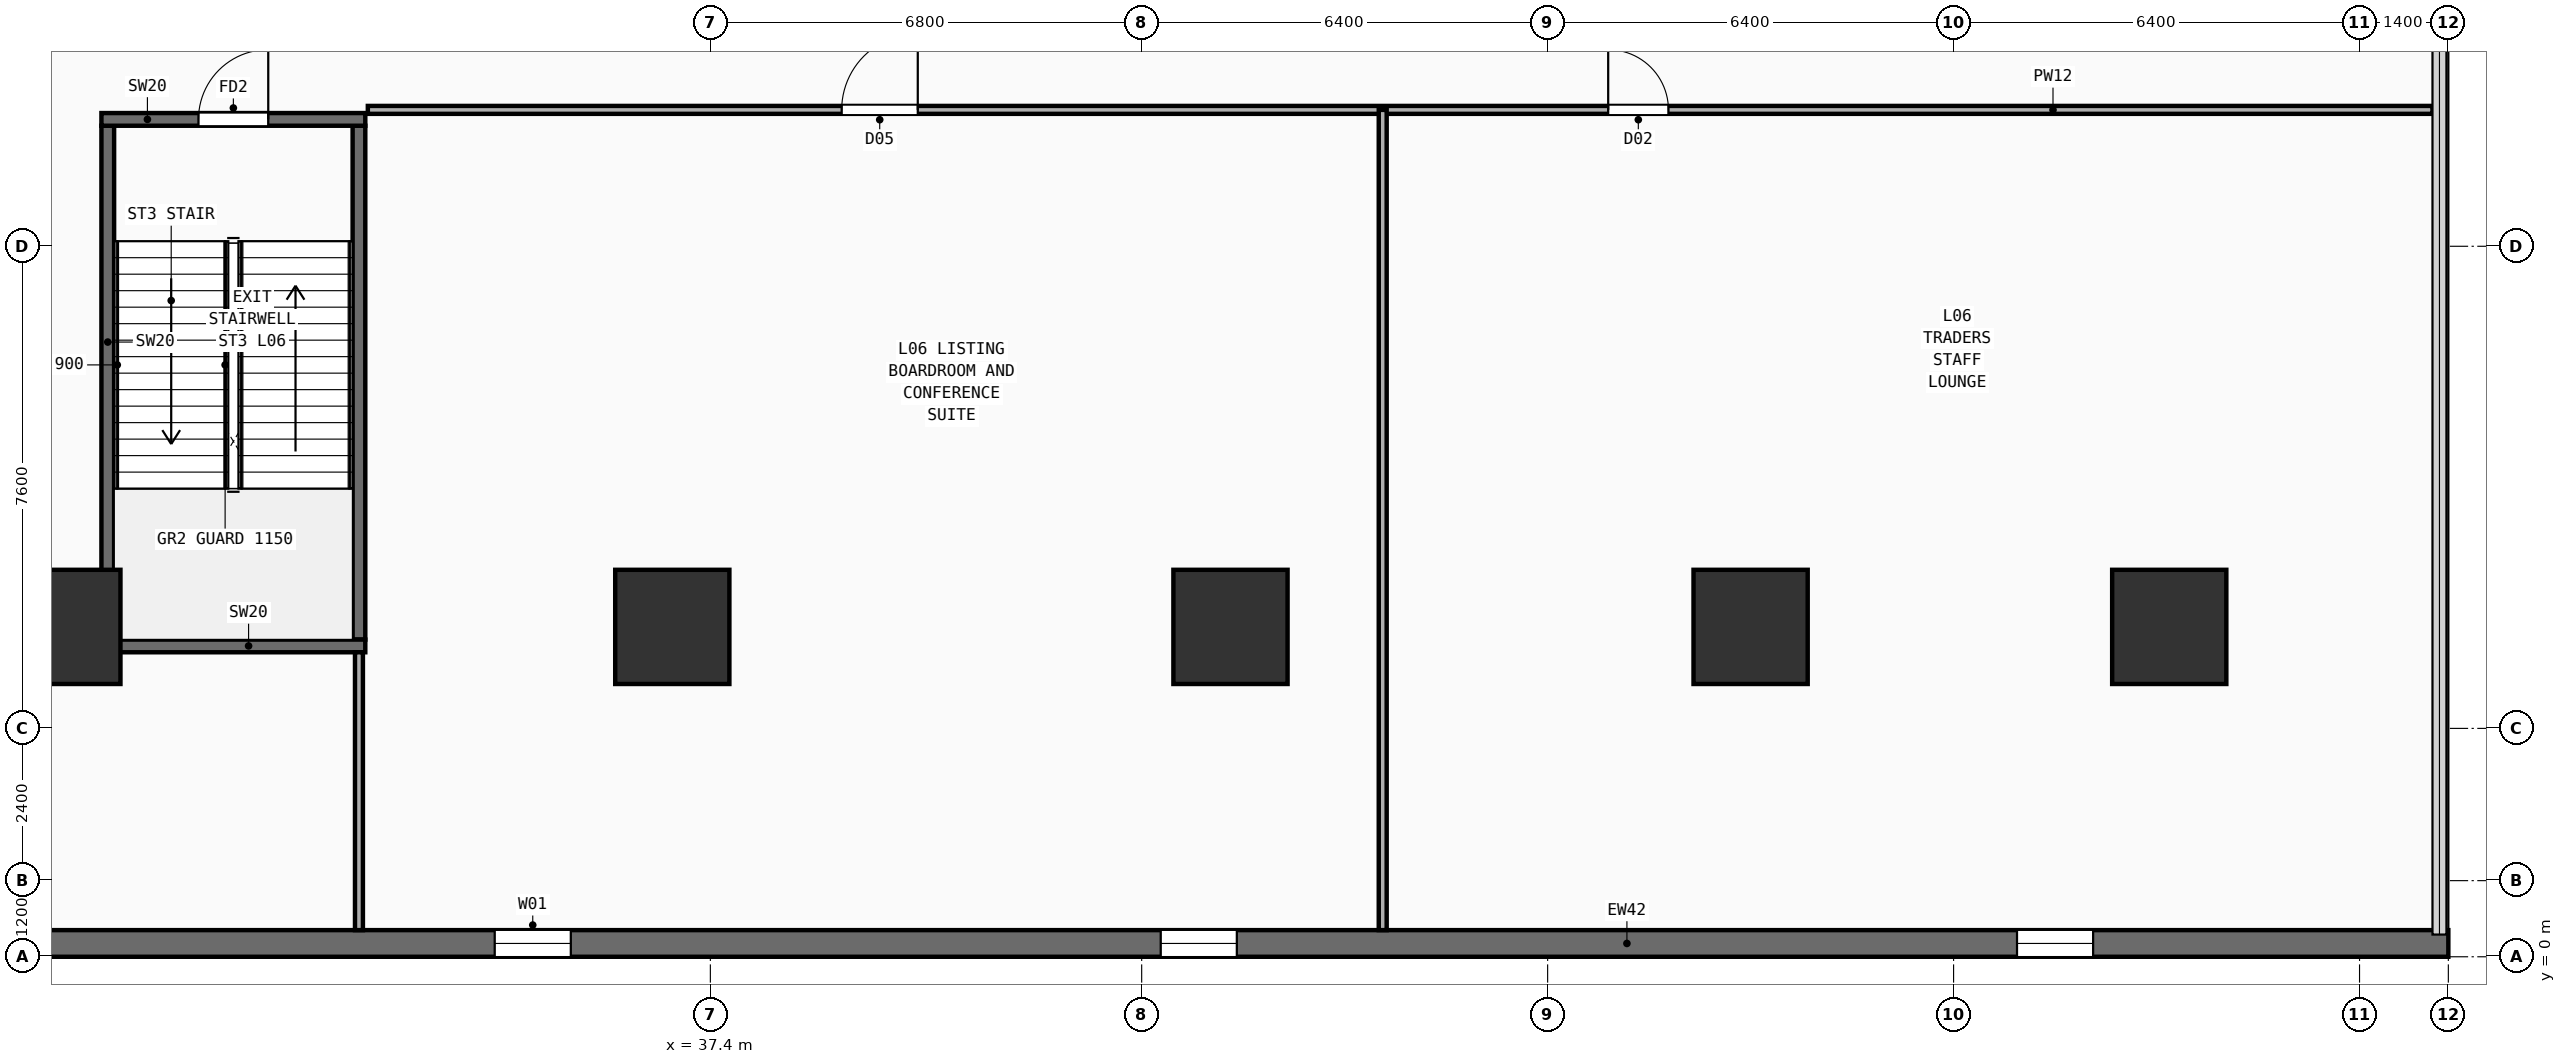
"""IFC4 building model, lengths in metres.
Left out: names, types, materials, properties, quantities, classifications, styles, units other than length and angle.
Written with IfcOpenShell. Run it as: python <this file> out.ifc"""

import sys

from ifc_helpers import new_model, si_unit, direction, frame, frame_2d, origin, origin_2d, place, context, subcontext, project, spatial, rectangle, extrude, element, fill, save


model = new_model("IFC4")
c1 = context("Model", 3, precision=1e-05, world=origin(), true_north=direction((0.0, 1.0)))
c2 = subcontext(c1, "Body", "Model", "MODEL_VIEW")
j1 = project(units=[si_unit("LENGTHUNIT", "METRE"), si_unit("PLANEANGLEUNIT", "RADIAN")], contexts=[c1])
p1 = place(None, origin())
s1 = spatial("IfcSite", under=j1, at=p1, CompositionType="ELEMENT")
p2 = place(p1, origin())
s2 = spatial("IfcBuilding", under=s1, at=p2, CompositionType="ELEMENT")
p3 = place(p2, frame((0.0, 0.0, 24.8)))
s3 = spatial("IfcBuildingStorey", under=s2, at=p3, CompositionType="ELEMENT", Elevation=24.8)
for number, where, z_axis, x_axis in (
    (1, (27.2, 5.2, 0.0), (0.0, 0.0, 1.0), (1.0, 0.0, 0.0)),
    (2, (36.8, 5.2, 0.0), (0.0, 0.0, 1.0), (1.0, 0.0, 0.0)),
    (3, (45.6, 5.2, 0.0), (0.0, 0.0, 1.0), (1.0, 0.0, 0.0)),
    (4, (53.8, 5.2, 0.0), (0.0, 0.0, 1.0), (1.0, 0.0, 0.0)),
    (5, (60.4, 5.2, 0.0), (0.0, 0.0, 1.0), (1.0, 0.0, 0.0)),
):
    element("IfcColumn", number, at=place(p3, frame(where, z_axis=z_axis, x_axis=x_axis)), inside=s3, PredefinedType="COLUMN", context=c2, shape_type="SweptSolid", body=[
        extrude(rectangle(XDim=1.8, YDim=1.8, at=origin_2d()), origin(), (0.0, 0.0, 1.0), 4.35),
    ])
p4 = place(p3, frame((0.0, 0.21, 0.0), z_axis=(0.0, 0.0, 1.0), x_axis=(1.0, 0.0, 0.0)))
e6 = element("IfcWall", 6, at=p4, inside=s3, PredefinedType="SOLIDWALL", context=c2, shape_type="SweptSolid", body=[
    extrude(rectangle(XDim=64.8, YDim=0.42, at=frame_2d((32.4, 0.0))), origin(), (0.0, 0.0, 1.0), 4.35),
])
p5 = place(p4, frame((8.0, 0.0, 0.95)))
e7 = element("IfcOpeningElement", 7, at=p5, cuts=e6, PredefinedType="OPENING", context=c2, shape_type="SweptSolid", body=[
    extrude(rectangle(XDim=1.2, YDim=1.6, at=frame_2d((0.6, 0.8))), frame((0.0, 0.22, 0.0), z_axis=(0.0, -1.0, 0.0), x_axis=(1.0, 0.0, 0.0)), (0.0, 0.0, 1.0), 0.44),
])
p6 = place(p4, frame((16.0, 0.0, 0.95)))
e8 = element("IfcOpeningElement", 8, at=p6, cuts=e6, PredefinedType="OPENING", context=c2, shape_type="SweptSolid", body=[
    extrude(rectangle(XDim=1.2, YDim=1.6, at=frame_2d((0.6, 0.8))), frame((0.0, 0.22, 0.0), z_axis=(0.0, -1.0, 0.0), x_axis=(1.0, 0.0, 0.0)), (0.0, 0.0, 1.0), 0.44),
])
p7 = place(p4, frame((24.0, 0.0, 0.95)))
e9 = element("IfcOpeningElement", 9, at=p7, cuts=e6, PredefinedType="OPENING", context=c2, shape_type="SweptSolid", body=[
    extrude(rectangle(XDim=1.2, YDim=1.6, at=frame_2d((0.6, 0.8))), frame((0.0, 0.22, 0.0), z_axis=(0.0, -1.0, 0.0), x_axis=(1.0, 0.0, 0.0)), (0.0, 0.0, 1.0), 0.44),
])
p8 = place(p4, frame((34.0, 0.0, 0.95)))
e10 = element("IfcOpeningElement", 10, at=p8, cuts=e6, PredefinedType="OPENING", context=c2, shape_type="SweptSolid", body=[
    extrude(rectangle(XDim=1.2, YDim=1.6, at=frame_2d((0.6, 0.8))), frame((0.0, 0.22, 0.0), z_axis=(0.0, -1.0, 0.0), x_axis=(1.0, 0.0, 0.0)), (0.0, 0.0, 1.0), 0.44),
])
p9 = place(p4, frame((44.5, 0.0, 0.95)))
e11 = element("IfcOpeningElement", 11, at=p9, cuts=e6, PredefinedType="OPENING", context=c2, shape_type="SweptSolid", body=[
    extrude(rectangle(XDim=1.2, YDim=1.6, at=frame_2d((0.6, 0.8))), frame((0.0, 0.22, 0.0), z_axis=(0.0, -1.0, 0.0), x_axis=(1.0, 0.0, 0.0)), (0.0, 0.0, 1.0), 0.44),
])
p10 = place(p4, frame((58.0, 0.0, 0.95)))
e12 = element("IfcOpeningElement", 12, at=p10, cuts=e6, PredefinedType="OPENING", context=c2, shape_type="SweptSolid", body=[
    extrude(rectangle(XDim=1.2, YDim=1.6, at=frame_2d((0.6, 0.8))), frame((0.0, 0.22, 0.0), z_axis=(0.0, -1.0, 0.0), x_axis=(1.0, 0.0, 0.0)), (0.0, 0.0, 1.0), 0.44),
])
for number, where, z_axis, x_axis in (
    (13, (27.9, 5.0, 0.0), (0.0, 0.0, 1.0), (0.0, 1.0, 0.0)),
    (14, (31.86, 5.0, 0.0), (0.0, 0.0, 1.0), (0.0, 1.0, 0.0)),
):
    element("IfcWall", number, at=place(p3, frame(where, z_axis=z_axis, x_axis=x_axis)), inside=s3, PredefinedType="SHEAR", context=c2, shape_type="SweptSolid", body=[
        extrude(rectangle(XDim=8.1, YDim=0.2, at=frame_2d((4.05, 0.0))), origin(), (0.0, 0.0, 1.0), 4.35),
    ])
p11 = place(p3, frame((27.8, 4.9, 0.0), z_axis=(0.0, 0.0, 1.0), x_axis=(1.0, 0.0, 0.0)))
e15 = element("IfcWall", 15, at=p11, inside=s3, PredefinedType="SHEAR", context=c2, shape_type="SweptSolid", body=[
    extrude(rectangle(XDim=4.16, YDim=0.2, at=frame_2d((2.08, 0.0))), origin(), (0.0, 0.0, 1.0), 4.35),
])
p12 = place(p3, frame((27.8, 13.2, 0.0), z_axis=(0.0, 0.0, 1.0), x_axis=(1.0, 0.0, 0.0)))
e16 = element("IfcWall", 16, at=p12, inside=s3, PredefinedType="SHEAR", context=c2, shape_type="SweptSolid", body=[
    extrude(rectangle(XDim=4.16, YDim=0.2, at=frame_2d((2.08, 0.0))), origin(), (0.0, 0.0, 1.0), 4.35),
])
p13 = place(p12, frame((1.53, 0.0, 0.0)))
e17 = element("IfcOpeningElement", 17, at=p13, cuts=e16, PredefinedType="OPENING", context=c2, shape_type="SweptSolid", body=[
    extrude(rectangle(XDim=1.1, YDim=2.2, at=frame_2d((0.55, 1.1))), frame((0.0, 0.11, 0.0), z_axis=(0.0, -1.0, 0.0), x_axis=(1.0, 0.0, 0.0)), (0.0, 0.0, 1.0), 0.22),
])
p14 = place(p3, frame((32.0, 13.35, 0.0), z_axis=(0.0, 0.0, 1.0), x_axis=(1.0, 0.0, 0.0)))
e18 = element("IfcWall", 18, at=p14, inside=s3, PredefinedType="PARTITIONING", context=c2, shape_type="SweptSolid", body=[
    extrude(rectangle(XDim=32.55, YDim=0.125, at=frame_2d((16.275, 0.0))), origin(), (0.0, 0.0, 1.0), 3.85),
])
p15 = place(p14, frame((7.47, 0.0, 0.0)))
e19 = element("IfcOpeningElement", 19, at=p15, cuts=e18, PredefinedType="OPENING", context=c2, shape_type="SweptSolid", body=[
    extrude(rectangle(XDim=1.2, YDim=2.25, at=frame_2d((0.6, 1.125))), frame((0.0, 0.073, 0.0), z_axis=(0.0, -1.0, 0.0), x_axis=(1.0, 0.0, 0.0)), (0.0, 0.0, 1.0), 0.145),
])
p16 = place(p14, frame((19.555, 0.0, 0.0)))
e20 = element("IfcOpeningElement", 20, at=p16, cuts=e18, PredefinedType="OPENING", context=c2, shape_type="SweptSolid", body=[
    extrude(rectangle(XDim=0.95, YDim=2.15, at=frame_2d((0.475, 1.075))), frame((0.0, 0.073, 0.0), z_axis=(0.0, -1.0, 0.0), x_axis=(1.0, 0.0, 0.0)), (0.0, 0.0, 1.0), 0.145),
])
p17 = place(p3, frame((31.86, 0.42, 0.0), z_axis=(0.0, 0.0, 1.0), x_axis=(0.0, 1.0, 0.0)))
e21 = element("IfcWall", 21, at=p17, inside=s3, PredefinedType="PARTITIONING", context=c2, shape_type="SweptSolid", body=[
    extrude(rectangle(XDim=4.38, YDim=0.125, at=frame_2d((2.19, 0.0))), origin(), (0.0, 0.0, 1.0), 4.35),
])
p18 = place(p3, frame((48.0, 0.42, 0.0), z_axis=(0.0, 0.0, 1.0), x_axis=(0.0, 1.0, 0.0)))
e22 = element("IfcWall", 22, at=p18, inside=s3, PredefinedType="PARTITIONING", context=c2, shape_type="SweptSolid", body=[
    extrude(rectangle(XDim=12.93, YDim=0.125, at=frame_2d((6.465, 0.0))), origin(), (0.0, 0.0, 1.0), 4.35),
])
p19 = place(p8, origin())
e23 = element("IfcWindow", 23, at=p19, inside=s3, PartitioningType="SINGLE_PANEL", PredefinedType="WINDOW", context=c2, shape_type="SweptSolid", body=[
    extrude(rectangle(XDim=1.2, YDim=1.6, at=frame_2d((0.6, 0.8))), frame((0.0, 0.03, 0.0), z_axis=(0.0, -1.0, 0.0), x_axis=(1.0, 0.0, 0.0)), (0.0, 0.0, 1.0), 0.06),
])
fill(e10, e23)
p20 = place(p9, origin())
e24 = element("IfcWindow", 24, at=p20, inside=s3, PartitioningType="SINGLE_PANEL", PredefinedType="WINDOW", context=c2, shape_type="SweptSolid", body=[
    extrude(rectangle(XDim=1.2, YDim=1.6, at=frame_2d((0.6, 0.8))), frame((0.0, 0.03, 0.0), z_axis=(0.0, -1.0, 0.0), x_axis=(1.0, 0.0, 0.0)), (0.0, 0.0, 1.0), 0.06),
])
fill(e11, e24)
p21 = place(p10, origin())
e25 = element("IfcWindow", 25, at=p21, inside=s3, PartitioningType="SINGLE_PANEL", PredefinedType="WINDOW", context=c2, shape_type="SweptSolid", body=[
    extrude(rectangle(XDim=1.2, YDim=1.6, at=frame_2d((0.6, 0.8))), frame((0.0, 0.03, 0.0), z_axis=(0.0, -1.0, 0.0), x_axis=(1.0, 0.0, 0.0)), (0.0, 0.0, 1.0), 0.06),
])
fill(e12, e25)
p22 = place(p13, frame((1.1, 0.0, 0.0), z_axis=(0.0, 0.0, 1.0), x_axis=(-1.0, 0.0, 0.0)))
e26 = element("IfcDoor", 26, at=p22, inside=s3, OperationType="SINGLE_SWING_LEFT", PredefinedType="DOOR", context=c2, shape_type="SweptSolid", body=[
    extrude(rectangle(XDim=1.1, YDim=2.2, at=frame_2d((0.55, 1.1))), frame((0.0, 0.025, 0.0), z_axis=(0.0, -1.0, 0.0), x_axis=(1.0, 0.0, 0.0)), (0.0, 0.0, 1.0), 0.05),
])
fill(e17, e26)
p23 = place(p15, origin())
e27 = element("IfcDoor", 27, at=p23, inside=s3, OperationType="SINGLE_SWING_RIGHT", PredefinedType="DOOR", context=c2, shape_type="SweptSolid", body=[
    extrude(rectangle(XDim=1.2, YDim=2.25, at=frame_2d((0.6, 1.125))), frame((0.0, 0.025, 0.0), z_axis=(0.0, -1.0, 0.0), x_axis=(1.0, 0.0, 0.0)), (0.0, 0.0, 1.0), 0.05),
])
fill(e19, e27)
p24 = place(p16, origin())
e28 = element("IfcDoor", 28, at=p24, inside=s3, OperationType="SINGLE_SWING_LEFT", PredefinedType="DOOR", context=c2, shape_type="SweptSolid", body=[
    extrude(rectangle(XDim=0.95, YDim=2.15, at=frame_2d((0.475, 1.075))), frame((0.0, 0.025, 0.0), z_axis=(0.0, -1.0, 0.0), x_axis=(1.0, 0.0, 0.0)), (0.0, 0.0, 1.0), 0.05),
])
fill(e20, e28)
save(model, sys.argv[1])
